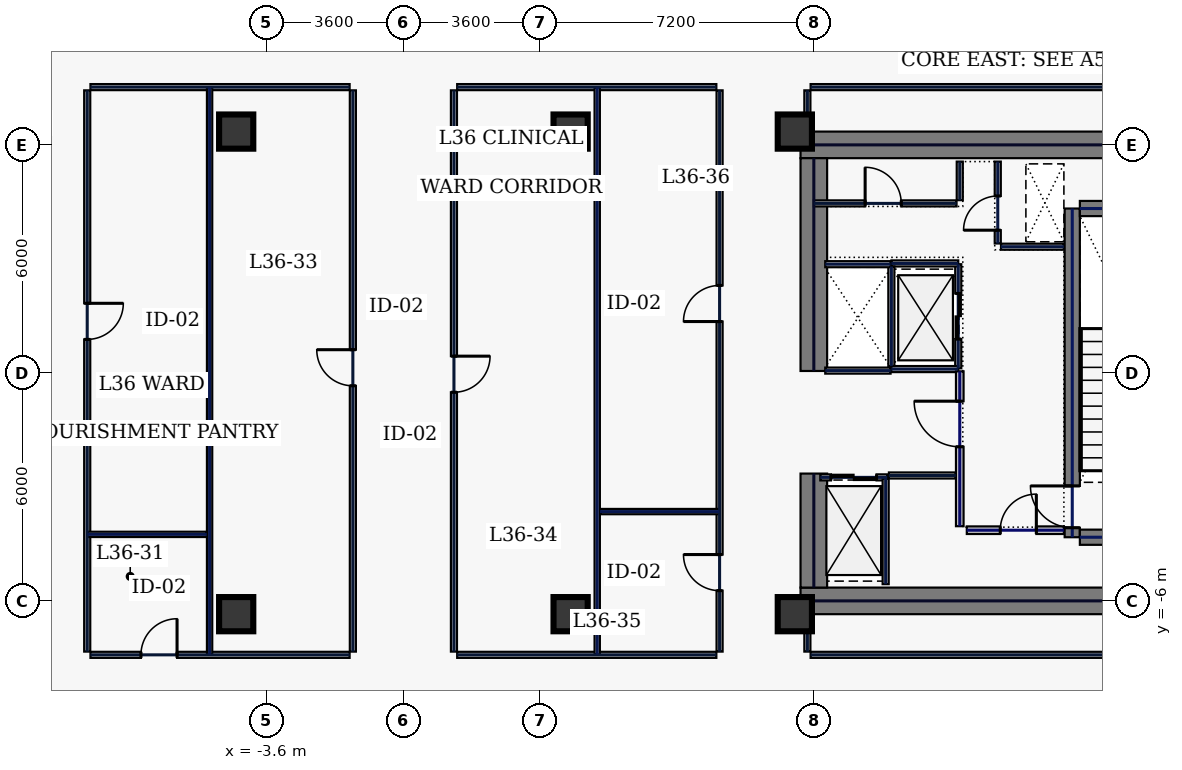
"""IFC4 building model, lengths in metres.
Left out: names, types, materials, properties, quantities, classifications, styles, units other than length and angle.
Written with IfcOpenShell. Run it as: python <this file> out.ifc"""

import sys

from ifc_helpers import new_model, si_unit, direction, frame, frame_2d, origin, origin_2d, place, context, subcontext, project, spatial, rectangle, hollow_rectangle, extrude, element, fill, save


model = new_model("IFC4")
c1 = context("Model", 3, precision=1e-05, world=origin(), true_north=direction((0.0, 1.0)))
c2 = subcontext(c1, "Body", "Model", "MODEL_VIEW")
j1 = project(units=[si_unit("LENGTHUNIT", "METRE"), si_unit("PLANEANGLEUNIT", "RADIAN")], contexts=[c1])
p1 = place(None, origin())
s1 = spatial("IfcSite", under=j1, at=p1, CompositionType="ELEMENT")
p2 = place(p1, origin())
s2 = spatial("IfcBuilding", under=s1, at=p2, CompositionType="ELEMENT")
p3 = place(p2, frame((0.0, 0.0, 160.2)))
s3 = spatial("IfcBuildingStorey", under=s2, at=p3, CompositionType="ELEMENT", Elevation=160.2)
for number, where, z_axis, x_axis in (
    (1, (10.45, 6.0, 0.0), (0.0, 0.0, 1.0), (1.0, 0.0, 0.0)),
    (2, (10.45, -6.0, 0.0), (0.0, 0.0, 1.0), (1.0, 0.0, 0.0)),
):
    element("IfcWall", number, at=place(p3, frame(where, z_axis=z_axis, x_axis=x_axis)), inside=s3, PredefinedType="SHEAR", context=c2, shape_type="SweptSolid", body=[
        extrude(rectangle(XDim=11.55, YDim=0.7, at=frame_2d((5.775, 0.0))), origin(), (0.0, 0.0, 1.0), 3.74),
    ])
p4 = place(p3, frame((10.8, -5.65, 0.0), z_axis=(0.0, 0.0, 1.0), x_axis=(0.0, 1.0, 0.0)))
e3 = element("IfcWall", 3, at=p4, inside=s3, PredefinedType="SHEAR", context=c2, shape_type="SweptSolid", body=[
    extrude(rectangle(XDim=3.0, YDim=0.7, at=frame_2d((1.5, 0.0))), origin(), (0.0, 0.0, 1.0), 3.74),
])
p5 = place(p3, frame((10.8, 0.05, 0.0), z_axis=(0.0, 0.0, 1.0), x_axis=(0.0, 1.0, 0.0)))
e4 = element("IfcWall", 4, at=p5, inside=s3, PredefinedType="SHEAR", context=c2, shape_type="SweptSolid", body=[
    extrude(rectangle(XDim=5.6, YDim=0.7, at=frame_2d((2.8, 0.0))), origin(), (0.0, 0.0, 1.0), 3.74),
])
p6 = place(p3, frame((17.6, -4.325, 0.0), z_axis=(0.0, 0.0, 1.0), x_axis=(0.0, 1.0, 0.0)))
e5 = element("IfcWall", 5, at=p6, inside=s3, PredefinedType="SHEAR", context=c2, shape_type="SweptSolid", body=[
    extrude(rectangle(XDim=8.65, YDim=0.4, at=frame_2d((4.325, 0.0))), origin(), (0.0, 0.0, 1.0), 3.74),
])
p7 = place(p6, frame((0.25, 0.0, 0.0)))
e6 = element("IfcOpeningElement", 6, at=p7, cuts=e5, PredefinedType="OPENING", context=c2, shape_type="SweptSolid", body=[
    extrude(rectangle(XDim=1.1, YDim=2.2, at=frame_2d((0.55, 1.1))), frame((0.0, 0.21, 0.0), z_axis=(0.0, -1.0, 0.0), x_axis=(1.0, 0.0, 0.0)), (0.0, 0.0, 1.0), 0.42),
])
for number, where, z_axis, x_axis in (
    (7, (17.8, -4.325, 0.0), (0.0, 0.0, 1.0), (1.0, 0.0, 0.0)),
    (8, (17.8, 4.325, 0.0), (0.0, 0.0, 1.0), (1.0, 0.0, 0.0)),
):
    element("IfcWall", number, at=place(p3, frame(where, z_axis=z_axis, x_axis=x_axis)), inside=s3, PredefinedType="SHEAR", context=c2, shape_type="SweptSolid", body=[
        extrude(rectangle(XDim=3.4, YDim=0.4, at=frame_2d((1.7, 0.0))), origin(), (0.0, 0.0, 1.0), 3.74),
    ])
for number, where, z_axis, x_axis in (
    (9, (10.3, -6.35, 0.0), (0.0, 0.0, 1.0), (1.0, 0.0, 0.0)),
    (10, (10.3, 6.35, 0.0), (0.0, 0.0, 1.0), (1.0, 0.0, 0.0)),
    (11, (-4.4, -6.35, 0.0), (0.0, 0.0, 1.0), (1.0, 0.0, 0.0)),
    (12, (4.4, -6.35, 0.0), (0.0, 0.0, 1.0), (1.0, 0.0, 0.0)),
    (13, (-4.4, 6.35, 0.0), (0.0, 0.0, 1.0), (1.0, 0.0, 0.0)),
    (14, (4.4, 6.35, 0.0), (0.0, 0.0, 1.0), (1.0, 0.0, 0.0)),
):
    element("IfcColumn", number, at=place(p3, frame(where, z_axis=z_axis, x_axis=x_axis)), inside=s3, PredefinedType="COLUMN", context=c2, shape_type="SweptSolid", body=[
        extrude(hollow_rectangle(XDim=0.9, YDim=0.9, WallThickness=0.04, at=origin_2d()), origin(), (0.0, 0.0, 1.0), 3.74),
    ])
p8 = place(p3, frame((14.6, 0.12, 0.0), z_axis=(0.0, 0.0, 1.0), x_axis=(0.0, 1.0, 0.0)))
e15 = element("IfcWall", 15, at=p8, inside=s3, PredefinedType="PARTITIONING", context=c2, shape_type="SweptSolid", body=[
    extrude(rectangle(XDim=2.74, YDim=0.16, at=frame_2d((1.37, 0.0))), origin(), (0.0, 0.0, 1.0), 3.74),
])
p9 = place(p8, frame((0.77, 0.0, 0.0)))
e16 = element("IfcOpeningElement", 16, at=p9, cuts=e15, PredefinedType="OPENING", context=c2, shape_type="SweptSolid", body=[
    extrude(rectangle(XDim=1.2, YDim=2.2, at=frame_2d((0.6, 1.1))), frame((0.0, 0.09, 0.0), z_axis=(0.0, -1.0, 0.0), x_axis=(1.0, 0.0, 0.0)), (0.0, 0.0, 1.0), 0.18),
])
for number, where, z_axis, x_axis in (
    (17, (12.84, 0.1, 0.0), (0.0, 0.0, 1.0), (1.0, 0.0, 0.0)),
    (18, (12.84, 2.88, 0.0), (0.0, 0.0, 1.0), (1.0, 0.0, 0.0)),
):
    element("IfcWall", number, at=place(p3, frame(where, z_axis=z_axis, x_axis=x_axis)), inside=s3, PredefinedType="PARTITIONING", context=c2, shape_type="SweptSolid", body=[
        extrude(rectangle(XDim=1.76, YDim=0.16, at=frame_2d((0.88, 0.0))), origin(), (0.0, 0.0, 1.0), 3.74),
    ])
p10 = place(p3, frame((12.84, 0.18, 0.0), z_axis=(0.0, 0.0, 1.0), x_axis=(0.0, 1.0, 0.0)))
e19 = element("IfcWall", 19, at=p10, inside=s3, PredefinedType="PARTITIONING", context=c2, shape_type="SweptSolid", body=[
    extrude(rectangle(XDim=2.62, YDim=0.16, at=frame_2d((1.31, 0.0))), origin(), (0.0, 0.0, 1.0), 3.74),
])
p11 = place(p3, frame((10.97, -2.75, 0.0), z_axis=(0.0, 0.0, 1.0), x_axis=(1.0, 0.0, 0.0)))
e20 = element("IfcWall", 20, at=p11, inside=s3, PredefinedType="PARTITIONING", context=c2, shape_type="SweptSolid", body=[
    extrude(rectangle(XDim=1.76, YDim=0.16, at=frame_2d((0.88, 0.0))), origin(), (0.0, 0.0, 1.0), 3.74),
])
p12 = place(p11, frame((0.28, 0.0, 0.0)))
e21 = element("IfcOpeningElement", 21, at=p12, cuts=e20, PredefinedType="OPENING", context=c2, shape_type="SweptSolid", body=[
    extrude(rectangle(XDim=1.2, YDim=2.2, at=frame_2d((0.6, 1.1))), frame((0.0, 0.09, 0.0), z_axis=(0.0, -1.0, 0.0), x_axis=(1.0, 0.0, 0.0)), (0.0, 0.0, 1.0), 0.18),
])
for number, where, z_axis, x_axis in (
    (22, (11.1, 0.06, 0.0), (0.0, 0.0, 1.0), (1.0, 0.0, 0.0)),
    (23, (11.1, 2.86, 0.0), (0.0, 0.0, 1.0), (1.0, 0.0, 0.0)),
):
    element("IfcWall", number, at=place(p3, frame(where, z_axis=z_axis, x_axis=x_axis)), inside=s3, PredefinedType="PARTITIONING", context=c2, shape_type="SweptSolid", body=[
        extrude(rectangle(XDim=1.72, YDim=0.16, at=frame_2d((0.86, 0.0))), origin(), (0.0, 0.0, 1.0), 3.74),
    ])
p13 = place(p3, frame((15.64, 3.405, 0.0), z_axis=(0.0, 0.0, 1.0), x_axis=(0.0, 1.0, 0.0)))
e24 = element("IfcWall", 24, at=p13, inside=s3, PredefinedType="PARTITIONING", context=c2, shape_type="SweptSolid", body=[
    extrude(rectangle(XDim=2.155, YDim=0.16, at=frame_2d((1.078, 0.0))), origin(), (0.0, 0.0, 1.0), 3.74),
])
p14 = place(p13, frame((0.35, 0.0, 0.0)))
e25 = element("IfcOpeningElement", 25, at=p14, cuts=e24, PredefinedType="OPENING", context=c2, shape_type="SweptSolid", body=[
    extrude(rectangle(XDim=0.9, YDim=2.2, at=frame_2d((0.45, 1.1))), frame((0.0, 0.09, 0.0), z_axis=(0.0, -1.0, 0.0), x_axis=(1.0, 0.0, 0.0)), (0.0, 0.0, 1.0), 0.18),
])
p15 = place(p3, frame((15.725, 3.32, 0.0), z_axis=(0.0, 0.0, 1.0), x_axis=(1.0, 0.0, 0.0)))
e26 = element("IfcWall", 26, at=p15, inside=s3, PredefinedType="PARTITIONING", context=c2, shape_type="SweptSolid", body=[
    extrude(rectangle(XDim=1.655, YDim=0.16, at=frame_2d((0.827, 0.0))), origin(), (0.0, 0.0, 1.0), 3.74),
])
p16 = place(p3, frame((14.825, -4.14, 0.0), z_axis=(0.0, 0.0, 1.0), x_axis=(1.0, 0.0, 0.0)))
e27 = element("IfcWall", 27, at=p16, inside=s3, PredefinedType="SOLIDWALL", context=c2, shape_type="SweptSolid", body=[
    extrude(rectangle(XDim=2.555, YDim=0.2, at=frame_2d((1.277, 0.0))), origin(), (0.0, 0.0, 1.0), 3.74),
])
p17 = place(p16, frame((0.88, 0.0, 0.0)))
e28 = element("IfcOpeningElement", 28, at=p17, cuts=e27, PredefinedType="OPENING", context=c2, shape_type="SweptSolid", body=[
    extrude(rectangle(XDim=0.95, YDim=2.2, at=frame_2d((0.475, 1.1))), frame((0.0, 0.11, 0.0), z_axis=(0.0, -1.0, 0.0), x_axis=(1.0, 0.0, 0.0)), (0.0, 0.0, 1.0), 0.22),
])
p18 = place(p3, frame((12.775, -2.7, 0.0), z_axis=(0.0, 0.0, 1.0), x_axis=(1.0, 0.0, 0.0)))
e29 = element("IfcWall", 29, at=p18, inside=s3, PredefinedType="PARTITIONING", context=c2, shape_type="SweptSolid", body=[
    extrude(rectangle(XDim=1.76, YDim=0.16, at=frame_2d((0.88, 0.0))), origin(), (0.0, 0.0, 1.0), 3.74),
])
p19 = place(p3, frame((12.69, -5.56, 0.0), z_axis=(0.0, 0.0, 1.0), x_axis=(0.0, 1.0, 0.0)))
e30 = element("IfcWall", 30, at=p19, inside=s3, PredefinedType="PARTITIONING", context=c2, shape_type="SweptSolid", body=[
    extrude(rectangle(XDim=2.775, YDim=0.16, at=frame_2d((1.388, 0.0))), origin(), (0.0, 0.0, 1.0), 3.74),
])
p20 = place(p3, frame((10.8, 4.46, 0.0), z_axis=(0.0, 0.0, 1.0), x_axis=(1.0, 0.0, 0.0)))
e31 = element("IfcWall", 31, at=p20, inside=s3, PredefinedType="PARTITIONING", context=c2, shape_type="SweptSolid", body=[
    extrude(rectangle(XDim=3.755, YDim=0.16, at=frame_2d((1.877, 0.0))), origin(), (0.0, 0.0, 1.0), 3.74),
])
p21 = place(p20, frame((1.35, 0.0, 0.0)))
e32 = element("IfcOpeningElement", 32, at=p21, cuts=e31, PredefinedType="OPENING", context=c2, shape_type="SweptSolid", body=[
    extrude(rectangle(XDim=0.95, YDim=2.2, at=frame_2d((0.475, 1.1))), frame((0.0, 0.09, 0.0), z_axis=(0.0, -1.0, 0.0), x_axis=(1.0, 0.0, 0.0)), (0.0, 0.0, 1.0), 0.18),
])
p22 = place(p3, frame((14.64, 4.545, 0.0), z_axis=(0.0, 0.0, 1.0), x_axis=(0.0, 1.0, 0.0)))
e33 = element("IfcWall", 33, at=p22, inside=s3, PredefinedType="PARTITIONING", context=c2, shape_type="SweptSolid", body=[
    extrude(rectangle(XDim=1.015, YDim=0.16, at=frame_2d((0.508, 0.0))), origin(), (0.0, 0.0, 1.0), 3.74),
])
p23 = place(p3, frame((14.64, -4.035, 0.0), z_axis=(0.0, 0.0, 1.0), x_axis=(0.0, 1.0, 0.0)))
e34 = element("IfcWall", 34, at=p23, inside=s3, PredefinedType="SOLIDWALL", context=c2, shape_type="SweptSolid", body=[
    extrude(rectangle(XDim=4.075, YDim=0.2, at=frame_2d((2.038, 0.0))), origin(), (0.0, 0.0, 1.0), 3.74),
])
p24 = place(p23, frame((2.09, 0.0, 0.0)))
e35 = element("IfcOpeningElement", 35, at=p24, cuts=e34, PredefinedType="OPENING", context=c2, shape_type="SweptSolid", body=[
    extrude(rectangle(XDim=1.2, YDim=2.2, at=frame_2d((0.6, 1.1))), frame((0.0, 0.11, 0.0), z_axis=(0.0, -1.0, 0.0), x_axis=(1.0, 0.0, 0.0)), (0.0, 0.0, 1.0), 0.22),
])
p25 = place(p3, frame((24.965, 7.52, 0.0), z_axis=(0.0, 0.0, 1.0), x_axis=(-1.0, 0.0, 0.0)))
e36 = element("IfcWall", 36, at=p25, inside=s3, PredefinedType="PARTITIONING", context=c2, shape_type="SweptSolid", body=[
    extrude(rectangle(XDim=14.25, YDim=0.16, at=frame_2d((7.125, 0.0))), origin(), (0.0, 0.0, 1.0), 3.74),
])
p26 = place(p3, frame((10.63, 7.435, 0.0), z_axis=(0.0, 0.0, 1.0), x_axis=(0.0, -1.0, 0.0)))
e37 = element("IfcWall", 37, at=p26, inside=s3, PredefinedType="PARTITIONING", context=c2, shape_type="SweptSolid", body=[
    extrude(rectangle(XDim=1.015, YDim=0.16, at=frame_2d((0.508, 0.0))), origin(), (0.0, 0.0, 1.0), 3.74),
])
p27 = place(p3, frame((10.63, -6.42, 0.0), z_axis=(0.0, 0.0, 1.0), x_axis=(0.0, -1.0, 0.0)))
e38 = element("IfcWall", 38, at=p27, inside=s3, PredefinedType="PARTITIONING", context=c2, shape_type="SweptSolid", body=[
    extrude(rectangle(XDim=0.915, YDim=0.16, at=frame_2d((0.458, 0.0))), origin(), (0.0, 0.0, 1.0), 3.74),
])
p28 = place(p3, frame((10.715, -7.42, 0.0), z_axis=(0.0, 0.0, 1.0), x_axis=(1.0, 0.0, 0.0)))
e39 = element("IfcWall", 39, at=p28, inside=s3, PredefinedType="PARTITIONING", context=c2, shape_type="SweptSolid", body=[
    extrude(rectangle(XDim=14.25, YDim=0.16, at=frame_2d((7.125, 0.0))), origin(), (0.0, 0.0, 1.0), 3.74),
])
p29 = place(p3, frame((8.235, 7.52, 0.0), z_axis=(0.0, 0.0, 1.0), x_axis=(-1.0, 0.0, 0.0)))
e40 = element("IfcWall", 40, at=p29, inside=s3, PredefinedType="PARTITIONING", context=c2, shape_type="SweptSolid", body=[
    extrude(rectangle(XDim=6.82, YDim=0.16, at=frame_2d((3.41, 0.0))), origin(), (0.0, 0.0, 1.0), 3.74),
])
p30 = place(p3, frame((1.33, 7.435, 0.0), z_axis=(0.0, 0.0, 1.0), x_axis=(0.0, -1.0, 0.0)))
e41 = element("IfcWall", 41, at=p30, inside=s3, PredefinedType="PARTITIONING", context=c2, shape_type="SweptSolid", body=[
    extrude(rectangle(XDim=14.77, YDim=0.16, at=frame_2d((7.385, 0.0))), origin(), (0.0, 0.0, 1.0), 3.74),
])
p31 = place(p30, frame((6.995, 0.0, 0.0)))
e42 = element("IfcOpeningElement", 42, at=p31, cuts=e41, PredefinedType="OPENING", context=c2, shape_type="SweptSolid", body=[
    extrude(rectangle(XDim=0.95, YDim=2.2, at=frame_2d((0.475, 1.1))), frame((0.0, 0.09, 0.0), z_axis=(0.0, -1.0, 0.0), x_axis=(1.0, 0.0, 0.0)), (0.0, 0.0, 1.0), 0.18),
])
p32 = place(p3, frame((1.415, -7.42, 0.0), z_axis=(0.0, 0.0, 1.0), x_axis=(1.0, 0.0, 0.0)))
e43 = element("IfcWall", 43, at=p32, inside=s3, PredefinedType="PARTITIONING", context=c2, shape_type="SweptSolid", body=[
    extrude(rectangle(XDim=6.82, YDim=0.16, at=frame_2d((3.41, 0.0))), origin(), (0.0, 0.0, 1.0), 3.74),
])
p33 = place(p3, frame((8.32, -7.335, 0.0), z_axis=(0.0, 0.0, 1.0), x_axis=(0.0, 1.0, 0.0)))
e44 = element("IfcWall", 44, at=p33, inside=s3, PredefinedType="PARTITIONING", context=c2, shape_type="SweptSolid", body=[
    extrude(rectangle(XDim=14.77, YDim=0.16, at=frame_2d((7.385, 0.0))), origin(), (0.0, 0.0, 1.0), 3.74),
])
p34 = place(p33, frame((1.604, 0.0, 0.0)))
e45 = element("IfcOpeningElement", 45, at=p34, cuts=e44, PredefinedType="OPENING", context=c2, shape_type="SweptSolid", body=[
    extrude(rectangle(XDim=0.95, YDim=2.2, at=frame_2d((0.475, 1.1))), frame((0.0, 0.09, 0.0), z_axis=(0.0, -1.0, 0.0), x_axis=(1.0, 0.0, 0.0)), (0.0, 0.0, 1.0), 0.18),
])
p35 = place(p33, frame((8.686, 0.0, 0.0)))
e46 = element("IfcOpeningElement", 46, at=p35, cuts=e44, PredefinedType="OPENING", context=c2, shape_type="SweptSolid", body=[
    extrude(rectangle(XDim=0.95, YDim=2.2, at=frame_2d((0.475, 1.1))), frame((0.0, 0.09, 0.0), z_axis=(0.0, -1.0, 0.0), x_axis=(1.0, 0.0, 0.0)), (0.0, 0.0, 1.0), 0.18),
])
p36 = place(p3, frame((-1.33, -7.335, 0.0), z_axis=(0.0, 0.0, 1.0), x_axis=(0.0, 1.0, 0.0)))
e47 = element("IfcWall", 47, at=p36, inside=s3, PredefinedType="PARTITIONING", context=c2, shape_type="SweptSolid", body=[
    extrude(rectangle(XDim=14.77, YDim=0.16, at=frame_2d((7.385, 0.0))), origin(), (0.0, 0.0, 1.0), 3.74),
])
p37 = place(p36, frame((6.995, 0.0, 0.0)))
e48 = element("IfcOpeningElement", 48, at=p37, cuts=e47, PredefinedType="OPENING", context=c2, shape_type="SweptSolid", body=[
    extrude(rectangle(XDim=0.95, YDim=2.2, at=frame_2d((0.475, 1.1))), frame((0.0, 0.09, 0.0), z_axis=(0.0, -1.0, 0.0), x_axis=(1.0, 0.0, 0.0)), (0.0, 0.0, 1.0), 0.18),
])
p38 = place(p3, frame((-1.415, 7.52, 0.0), z_axis=(0.0, 0.0, 1.0), x_axis=(-1.0, 0.0, 0.0)))
e49 = element("IfcWall", 49, at=p38, inside=s3, PredefinedType="PARTITIONING", context=c2, shape_type="SweptSolid", body=[
    extrude(rectangle(XDim=6.82, YDim=0.16, at=frame_2d((3.41, 0.0))), origin(), (0.0, 0.0, 1.0), 3.74),
])
p39 = place(p3, frame((-8.32, 7.435, 0.0), z_axis=(0.0, 0.0, 1.0), x_axis=(0.0, -1.0, 0.0)))
e50 = element("IfcWall", 50, at=p39, inside=s3, PredefinedType="PARTITIONING", context=c2, shape_type="SweptSolid", body=[
    extrude(rectangle(XDim=14.77, YDim=0.16, at=frame_2d((7.385, 0.0))), origin(), (0.0, 0.0, 1.0), 3.74),
])
p40 = place(p39, frame((5.604, 0.0, 0.0)))
e51 = element("IfcOpeningElement", 51, at=p40, cuts=e50, PredefinedType="OPENING", context=c2, shape_type="SweptSolid", body=[
    extrude(rectangle(XDim=0.95, YDim=2.2, at=frame_2d((0.475, 1.1))), frame((0.0, 0.09, 0.0), z_axis=(0.0, -1.0, 0.0), x_axis=(1.0, 0.0, 0.0)), (0.0, 0.0, 1.0), 0.18),
])
p41 = place(p3, frame((-8.235, -7.42, 0.0), z_axis=(0.0, 0.0, 1.0), x_axis=(1.0, 0.0, 0.0)))
e52 = element("IfcWall", 52, at=p41, inside=s3, PredefinedType="PARTITIONING", context=c2, shape_type="SweptSolid", body=[
    extrude(rectangle(XDim=6.82, YDim=0.16, at=frame_2d((3.41, 0.0))), origin(), (0.0, 0.0, 1.0), 3.74),
])
p42 = place(p41, frame((1.329, 0.0, 0.0)))
e53 = element("IfcOpeningElement", 53, at=p42, cuts=e52, PredefinedType="OPENING", context=c2, shape_type="SweptSolid", body=[
    extrude(rectangle(XDim=0.95, YDim=2.2, at=frame_2d((0.475, 1.1))), frame((0.0, 0.09, 0.0), z_axis=(0.0, -1.0, 0.0), x_axis=(1.0, 0.0, 0.0)), (0.0, 0.0, 1.0), 0.18),
])
for number, where, z_axis, x_axis in (
    (54, (-5.1, -7.415, 0.0), (0.0, 0.0, 1.0), (0.0, 1.0, 0.0)),
    (55, (5.1, -7.415, 0.0), (0.0, 0.0, 1.0), (0.0, 1.0, 0.0)),
):
    element("IfcWall", number, at=place(p3, frame(where, z_axis=z_axis, x_axis=x_axis)), inside=s3, PredefinedType="PARTITIONING", context=c2, shape_type="SweptSolid", body=[
        extrude(rectangle(XDim=14.93, YDim=0.14, at=frame_2d((7.465, 0.0))), origin(), (0.0, 0.0, 1.0), 3.74),
    ])
for number, where, z_axis, x_axis in (
    (56, (-8.315, -4.25, 0.0), (0.0, 0.0, 1.0), (1.0, 0.0, 0.0)),
    (57, (5.175, -3.65, 0.0), (0.0, 0.0, 1.0), (1.0, 0.0, 0.0)),
):
    element("IfcWall", number, at=place(p3, frame(where, z_axis=z_axis, x_axis=x_axis)), inside=s3, PredefinedType="PARTITIONING", context=c2, shape_type="SweptSolid", body=[
        extrude(rectangle(XDim=3.14, YDim=0.14, at=frame_2d((1.57, 0.0))), origin(), (0.0, 0.0, 1.0), 3.74),
    ])
p43 = place(p7, origin())
e58 = element("IfcDoor", 58, at=p43, inside=s3, OperationType="SINGLE_SWING_RIGHT", PredefinedType="DOOR", context=c2, shape_type="SweptSolid", body=[
    extrude(rectangle(XDim=1.1, YDim=2.2, at=frame_2d((0.55, 1.1))), frame((0.0, 0.025, 0.0), z_axis=(0.0, -1.0, 0.0), x_axis=(1.0, 0.0, 0.0)), (0.0, 0.0, 1.0), 0.05),
])
fill(e6, e58)
p44 = place(p9, origin())
e59 = element("IfcDoor", 59, at=p44, inside=s3, OperationType="SLIDING_TO_LEFT", PredefinedType="DOOR", context=c2, shape_type="SweptSolid", body=[
    extrude(rectangle(XDim=1.2, YDim=2.2, at=frame_2d((0.6, 1.1))), frame((0.0, 0.025, 0.0), z_axis=(0.0, -1.0, 0.0), x_axis=(1.0, 0.0, 0.0)), (0.0, 0.0, 1.0), 0.05),
])
fill(e16, e59)
p45 = place(p12, origin())
e60 = element("IfcDoor", 60, at=p45, inside=s3, OperationType="SLIDING_TO_LEFT", PredefinedType="DOOR", context=c2, shape_type="SweptSolid", body=[
    extrude(rectangle(XDim=1.2, YDim=2.2, at=frame_2d((0.6, 1.1))), frame((0.0, 0.025, 0.0), z_axis=(0.0, -1.0, 0.0), x_axis=(1.0, 0.0, 0.0)), (0.0, 0.0, 1.0), 0.05),
])
fill(e21, e60)
p46 = place(p14, origin())
e61 = element("IfcDoor", 61, at=p46, inside=s3, OperationType="SINGLE_SWING_LEFT", PredefinedType="DOOR", context=c2, shape_type="SweptSolid", body=[
    extrude(rectangle(XDim=0.9, YDim=2.2, at=frame_2d((0.45, 1.1))), frame((0.0, 0.025, 0.0), z_axis=(0.0, -1.0, 0.0), x_axis=(1.0, 0.0, 0.0)), (0.0, 0.0, 1.0), 0.05),
])
fill(e25, e61)
p47 = place(p17, origin())
e62 = element("IfcDoor", 62, at=p47, inside=s3, OperationType="SINGLE_SWING_RIGHT", PredefinedType="DOOR", context=c2, shape_type="SweptSolid", body=[
    extrude(rectangle(XDim=0.95, YDim=2.2, at=frame_2d((0.475, 1.1))), frame((0.0, 0.025, 0.0), z_axis=(0.0, -1.0, 0.0), x_axis=(1.0, 0.0, 0.0)), (0.0, 0.0, 1.0), 0.05),
])
fill(e28, e62)
p48 = place(p21, origin())
e63 = element("IfcDoor", 63, at=p48, inside=s3, OperationType="SINGLE_SWING_LEFT", PredefinedType="DOOR", context=c2, shape_type="SweptSolid", body=[
    extrude(rectangle(XDim=0.95, YDim=2.2, at=frame_2d((0.475, 1.1))), frame((0.0, 0.025, 0.0), z_axis=(0.0, -1.0, 0.0), x_axis=(1.0, 0.0, 0.0)), (0.0, 0.0, 1.0), 0.05),
])
fill(e32, e63)
p49 = place(p24, origin())
e64 = element("IfcDoor", 64, at=p49, inside=s3, OperationType="SINGLE_SWING_RIGHT", PredefinedType="DOOR", context=c2, shape_type="SweptSolid", body=[
    extrude(rectangle(XDim=1.2, YDim=2.2, at=frame_2d((0.6, 1.1))), frame((0.0, 0.025, 0.0), z_axis=(0.0, -1.0, 0.0), x_axis=(1.0, 0.0, 0.0)), (0.0, 0.0, 1.0), 0.05),
])
fill(e35, e64)
p50 = place(p42, origin())
e65 = element("IfcDoor", 65, at=p50, inside=s3, OperationType="SINGLE_SWING_RIGHT", PredefinedType="DOOR", context=c2, shape_type="SweptSolid", body=[
    extrude(rectangle(XDim=0.95, YDim=2.2, at=frame_2d((0.475, 1.1))), frame((0.0, 0.025, 0.0), z_axis=(0.0, -1.0, 0.0), x_axis=(1.0, 0.0, 0.0)), (0.0, 0.0, 1.0), 0.05),
])
fill(e53, e65)
p51 = place(p40, origin())
e66 = element("IfcDoor", 66, at=p51, inside=s3, OperationType="SINGLE_SWING_LEFT", PredefinedType="DOOR", context=c2, shape_type="SweptSolid", body=[
    extrude(rectangle(XDim=0.95, YDim=2.2, at=frame_2d((0.475, 1.1))), frame((0.0, 0.025, 0.0), z_axis=(0.0, -1.0, 0.0), x_axis=(1.0, 0.0, 0.0)), (0.0, 0.0, 1.0), 0.05),
])
fill(e51, e66)
p52 = place(p37, origin())
e67 = element("IfcDoor", 67, at=p52, inside=s3, OperationType="SINGLE_SWING_RIGHT", PredefinedType="DOOR", context=c2, shape_type="SweptSolid", body=[
    extrude(rectangle(XDim=0.95, YDim=2.2, at=frame_2d((0.475, 1.1))), frame((0.0, 0.025, 0.0), z_axis=(0.0, -1.0, 0.0), x_axis=(1.0, 0.0, 0.0)), (0.0, 0.0, 1.0), 0.05),
])
fill(e48, e67)
p53 = place(p31, origin())
e68 = element("IfcDoor", 68, at=p53, inside=s3, OperationType="SINGLE_SWING_LEFT", PredefinedType="DOOR", context=c2, shape_type="SweptSolid", body=[
    extrude(rectangle(XDim=0.95, YDim=2.2, at=frame_2d((0.475, 1.1))), frame((0.0, 0.025, 0.0), z_axis=(0.0, -1.0, 0.0), x_axis=(1.0, 0.0, 0.0)), (0.0, 0.0, 1.0), 0.05),
])
fill(e42, e68)
p54 = place(p34, origin())
e69 = element("IfcDoor", 69, at=p54, inside=s3, OperationType="SINGLE_SWING_RIGHT", PredefinedType="DOOR", context=c2, shape_type="SweptSolid", body=[
    extrude(rectangle(XDim=0.95, YDim=2.2, at=frame_2d((0.475, 1.1))), frame((0.0, 0.025, 0.0), z_axis=(0.0, -1.0, 0.0), x_axis=(1.0, 0.0, 0.0)), (0.0, 0.0, 1.0), 0.05),
])
fill(e45, e69)
p55 = place(p35, origin())
e70 = element("IfcDoor", 70, at=p55, inside=s3, OperationType="SINGLE_SWING_LEFT", PredefinedType="DOOR", context=c2, shape_type="SweptSolid", body=[
    extrude(rectangle(XDim=0.95, YDim=2.2, at=frame_2d((0.475, 1.1))), frame((0.0, 0.025, 0.0), z_axis=(0.0, -1.0, 0.0), x_axis=(1.0, 0.0, 0.0)), (0.0, 0.0, 1.0), 0.05),
])
fill(e46, e70)
save(model, sys.argv[1])
